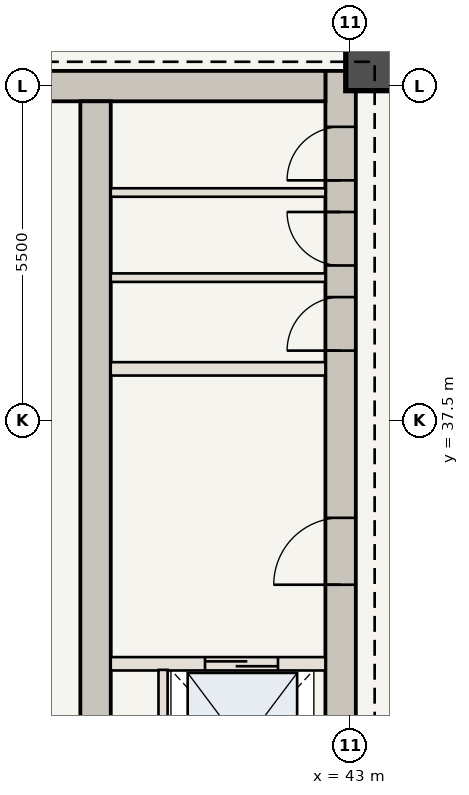
"""IFC4 building model, lengths in metres.
Left out: names, types, materials, properties, quantities, classifications, styles, units other than length and angle.
Written with IfcOpenShell. Run it as: python <this file> out.ifc"""

import sys

from ifc_helpers import new_model, si_unit, direction, frame, frame_2d, origin, origin_2d, place, context, subcontext, project, spatial, rectangle, extrude, element, fill, save


model = new_model("IFC4")
c1 = context("Model", 3, precision=1e-05, world=origin(), true_north=direction((0.0, 1.0)))
c2 = subcontext(c1, "Body", "Model", "MODEL_VIEW")
j1 = project(units=[si_unit("LENGTHUNIT", "METRE"), si_unit("PLANEANGLEUNIT", "RADIAN")], contexts=[c1])
p1 = place(None, origin())
s1 = spatial("IfcSite", under=j1, at=p1, CompositionType="ELEMENT")
p2 = place(p1, origin())
s2 = spatial("IfcBuilding", under=s1, at=p2, CompositionType="ELEMENT")
p3 = place(p2, frame((0.0, 0.0, 202.3)))
s3 = spatial("IfcBuildingStorey", under=s2, at=p3, CompositionType="ELEMENT", Elevation=202.3)
p4 = place(p3, frame((42.84, 30.6, 0.0), z_axis=(0.0, 0.0, 1.0), x_axis=(0.0, 1.0, 0.0)))
e1 = element("IfcWall", 1, at=p4, inside=s3, PredefinedType="SHEAR", context=c2, shape_type="SweptSolid", body=[
    extrude(rectangle(XDim=12.65, YDim=0.5, at=frame_2d((6.325, 0.0))), origin(), (0.0, 0.0, 1.0), 3.85),
])
p5 = place(p4, frame((4.2, 0.0, 0.0)))
e2 = element("IfcOpeningElement", 2, at=p5, cuts=e1, PredefinedType="OPENING", context=c2, shape_type="SweptSolid", body=[
    extrude(rectangle(XDim=1.1, YDim=2.15, at=frame_2d((0.55, 1.075))), frame((0.0, 0.26, 0.0), z_axis=(0.0, -1.0, 0.0), x_axis=(1.0, 0.0, 0.0)), (0.0, 0.0, 1.0), 0.52),
])
p6 = place(p4, frame((8.05, 0.0, 0.0)))
e3 = element("IfcOpeningElement", 3, at=p6, cuts=e1, PredefinedType="OPENING", context=c2, shape_type="SweptSolid", body=[
    extrude(rectangle(XDim=0.88, YDim=2.1, at=frame_2d((0.44, 1.05))), frame((0.0, 0.26, 0.0), z_axis=(0.0, -1.0, 0.0), x_axis=(1.0, 0.0, 0.0)), (0.0, 0.0, 1.0), 0.52),
])
p7 = place(p4, frame((9.45, 0.0, 0.0)))
e4 = element("IfcOpeningElement", 4, at=p7, cuts=e1, PredefinedType="OPENING", context=c2, shape_type="SweptSolid", body=[
    extrude(rectangle(XDim=0.88, YDim=2.1, at=frame_2d((0.44, 1.05))), frame((0.0, 0.26, 0.0), z_axis=(0.0, -1.0, 0.0), x_axis=(1.0, 0.0, 0.0)), (0.0, 0.0, 1.0), 0.52),
])
p8 = place(p4, frame((10.85, 0.0, 0.0)))
e5 = element("IfcOpeningElement", 5, at=p8, cuts=e1, PredefinedType="OPENING", context=c2, shape_type="SweptSolid", body=[
    extrude(rectangle(XDim=0.88, YDim=2.1, at=frame_2d((0.44, 1.05))), frame((0.0, 0.26, 0.0), z_axis=(0.0, -1.0, 0.0), x_axis=(1.0, 0.0, 0.0)), (0.0, 0.0, 1.0), 0.52),
])
p9 = place(p3, frame((37.75, 43.0, 0.0), z_axis=(0.0, 0.0, 1.0), x_axis=(1.0, 0.0, 0.0)))
e6 = element("IfcWall", 6, at=p9, inside=s3, PredefinedType="SHEAR", context=c2, shape_type="SweptSolid", body=[
    extrude(rectangle(XDim=4.84, YDim=0.5, at=frame_2d((2.42, 0.0))), origin(), (0.0, 0.0, 1.0), 3.85),
])
p10 = place(p3, frame((38.81, 30.6, 0.0), z_axis=(0.0, 0.0, 1.0), x_axis=(0.0, 1.0, 0.0)))
e7 = element("IfcWall", 7, at=p10, inside=s3, PredefinedType="SHEAR", context=c2, shape_type="SweptSolid", body=[
    extrude(rectangle(XDim=12.15, YDim=0.5, at=frame_2d((6.075, 0.0))), origin(), (0.0, 0.0, 1.0), 3.85),
])
p11 = place(p3, frame((43.35, 43.35, 0.0), z_axis=(0.0, 0.0, 1.0), x_axis=(1.0, 0.0, 0.0)))
e8 = element("IfcColumn", 8, at=p11, inside=s3, PredefinedType="COLUMN", context=c2, shape_type="SweptSolid", body=[
    extrude(rectangle(XDim=0.85, YDim=0.85, at=origin_2d()), origin(), (0.0, 0.0, 1.0), 3.85),
])
p12 = place(p3, frame((39.06, 33.5, 0.0), z_axis=(0.0, 0.0, 1.0), x_axis=(1.0, 0.0, 0.0)))
e9 = element("IfcWall", 9, at=p12, inside=s3, PredefinedType="STANDARD", context=c2, shape_type="SweptSolid", body=[
    extrude(rectangle(XDim=3.53, YDim=0.22, at=frame_2d((1.765, 0.0))), origin(), (0.0, 0.0, 1.0), 3.685),
])
p13 = place(p12, frame((1.55, 0.0, 0.0)))
e10 = element("IfcOpeningElement", 10, at=p13, cuts=e9, PredefinedType="OPENING", context=c2, shape_type="SweptSolid", body=[
    extrude(rectangle(XDim=1.2, YDim=2.2, at=frame_2d((0.6, 1.1))), frame((0.0, 0.12, 0.0), z_axis=(0.0, -1.0, 0.0), x_axis=(1.0, 0.0, 0.0)), (0.0, 0.0, 1.0), 0.24),
])
p14 = place(p3, frame((39.92, 30.75, 0.0), z_axis=(0.0, 0.0, 1.0), x_axis=(0.0, 1.0, 0.0)))
e11 = element("IfcWall", 11, at=p14, inside=s3, PredefinedType="STANDARD", context=c2, shape_type="SweptSolid", body=[
    extrude(rectangle(XDim=2.65, YDim=0.15, at=frame_2d((1.325, 0.0))), origin(), (0.0, 0.0, 1.0), 3.685),
])
p15 = place(p3, frame((39.06, 38.35, 0.0), z_axis=(0.0, 0.0, 1.0), x_axis=(1.0, 0.0, 0.0)))
e12 = element("IfcWall", 12, at=p15, inside=s3, PredefinedType="STANDARD", context=c2, shape_type="SweptSolid", body=[
    extrude(rectangle(XDim=3.53, YDim=0.22, at=frame_2d((1.765, 0.0))), origin(), (0.0, 0.0, 1.0), 3.685),
])
for number, where, z_axis, x_axis in (
    (13, (39.06, 39.85, 0.0), (0.0, 0.0, 1.0), (1.0, 0.0, 0.0)),
    (14, (39.06, 41.25, 0.0), (0.0, 0.0, 1.0), (1.0, 0.0, 0.0)),
):
    element("IfcWall", number, at=place(p3, frame(where, z_axis=z_axis, x_axis=x_axis)), inside=s3, PredefinedType="STANDARD", context=c2, shape_type="SweptSolid", body=[
        extrude(rectangle(XDim=3.53, YDim=0.14, at=frame_2d((1.765, 0.0))), origin(), (0.0, 0.0, 1.0), 3.685),
    ])
p16 = place(p5, origin())
e15 = element("IfcDoor", 15, at=p16, inside=s3, OperationType="SINGLE_SWING_LEFT", PredefinedType="DOOR", context=c2, shape_type="SweptSolid", body=[
    extrude(rectangle(XDim=1.1, YDim=2.15, at=frame_2d((0.55, 1.075))), frame((0.0, 0.025, 0.0), z_axis=(0.0, -1.0, 0.0), x_axis=(1.0, 0.0, 0.0)), (0.0, 0.0, 1.0), 0.05),
])
fill(e2, e15)
p17 = place(p6, origin())
e16 = element("IfcDoor", 16, at=p17, inside=s3, OperationType="SINGLE_SWING_LEFT", PredefinedType="DOOR", context=c2, shape_type="SweptSolid", body=[
    extrude(rectangle(XDim=0.88, YDim=2.1, at=frame_2d((0.44, 1.05))), frame((0.0, 0.025, 0.0), z_axis=(0.0, -1.0, 0.0), x_axis=(1.0, 0.0, 0.0)), (0.0, 0.0, 1.0), 0.05),
])
fill(e3, e16)
p18 = place(p7, origin())
e17 = element("IfcDoor", 17, at=p18, inside=s3, OperationType="SINGLE_SWING_RIGHT", PredefinedType="DOOR", context=c2, shape_type="SweptSolid", body=[
    extrude(rectangle(XDim=0.88, YDim=2.1, at=frame_2d((0.44, 1.05))), frame((0.0, 0.025, 0.0), z_axis=(0.0, -1.0, 0.0), x_axis=(1.0, 0.0, 0.0)), (0.0, 0.0, 1.0), 0.05),
])
fill(e4, e17)
p19 = place(p8, origin())
e18 = element("IfcDoor", 18, at=p19, inside=s3, OperationType="SINGLE_SWING_LEFT", PredefinedType="DOOR", context=c2, shape_type="SweptSolid", body=[
    extrude(rectangle(XDim=0.88, YDim=2.1, at=frame_2d((0.44, 1.05))), frame((0.0, 0.025, 0.0), z_axis=(0.0, -1.0, 0.0), x_axis=(1.0, 0.0, 0.0)), (0.0, 0.0, 1.0), 0.05),
])
fill(e5, e18)
p20 = place(p13, origin())
e19 = element("IfcDoor", 19, at=p20, inside=s3, OperationType="DOUBLE_DOOR_SLIDING", PredefinedType="DOOR", context=c2, shape_type="SweptSolid", body=[
    extrude(rectangle(XDim=1.2, YDim=2.2, at=frame_2d((0.6, 1.1))), frame((0.0, 0.025, 0.0), z_axis=(0.0, -1.0, 0.0), x_axis=(1.0, 0.0, 0.0)), (0.0, 0.0, 1.0), 0.05),
])
fill(e10, e19)
save(model, sys.argv[1])
